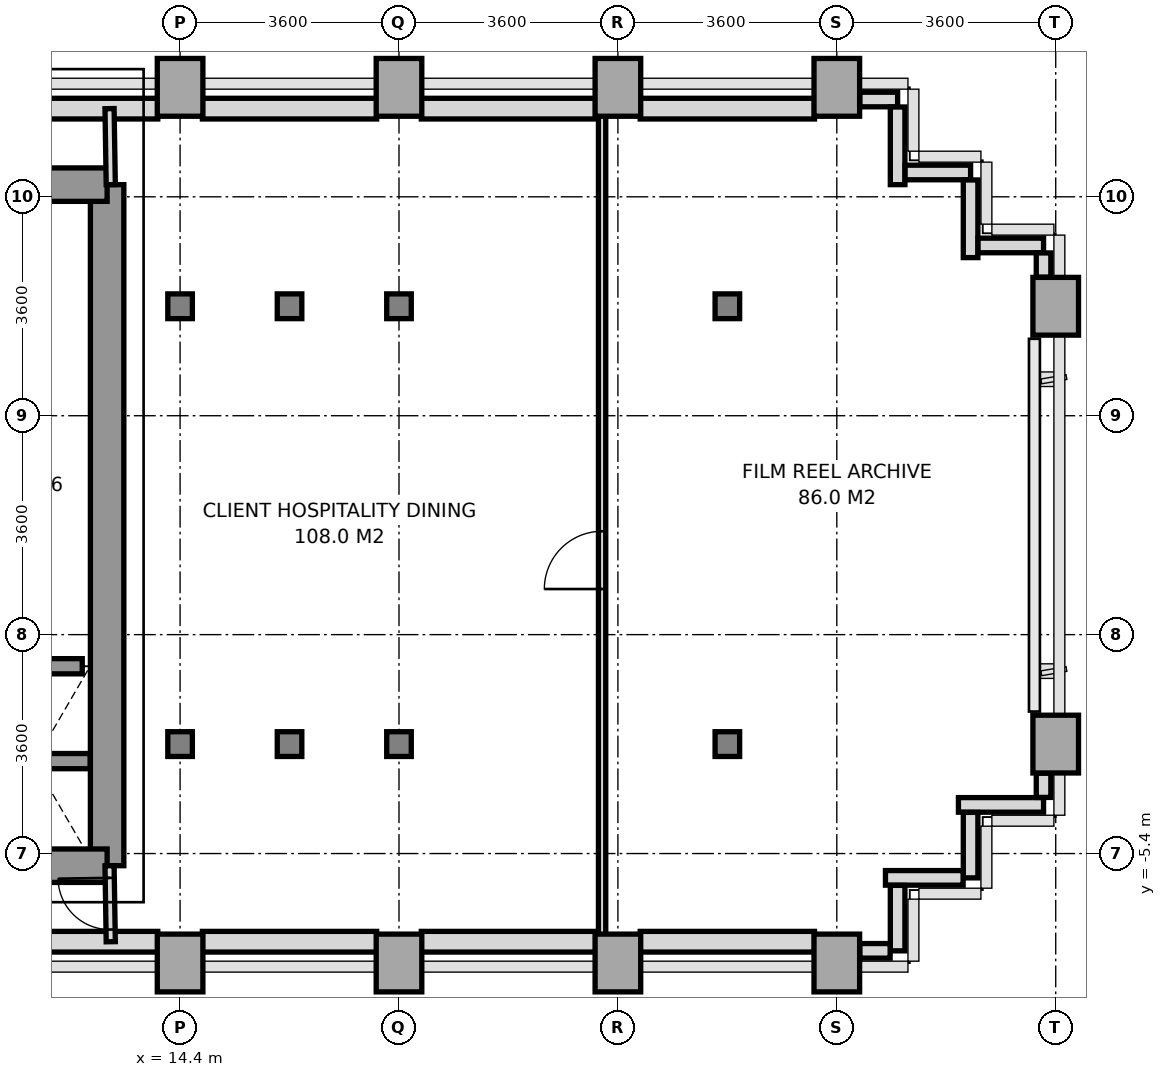
"""IFC4 building model, lengths in metres.
Left out: names, types, materials, properties, quantities, classifications, styles, units other than length and angle.
Written with IfcOpenShell. Run it as: python <this file> out.ifc"""

import sys

from ifc_helpers import new_model, si_unit, direction, frame, frame_2d, origin, origin_2d, place, context, subcontext, project, spatial, rectangle, i_section, extrude, source, transform, mapped, element, fill, save


model = new_model("IFC4")
c1 = context("Model", 3, precision=1e-05, world=origin(), true_north=direction((0.0, 1.0)))
c2 = subcontext(c1, "Body", "Model", "MODEL_VIEW")
j1 = project(units=[si_unit("LENGTHUNIT", "METRE"), si_unit("PLANEANGLEUNIT", "RADIAN")], contexts=[c1])
p1 = place(None, origin())
s1 = spatial("IfcSite", under=j1, at=p1, CompositionType="ELEMENT")
p2 = place(p1, origin())
s2 = spatial("IfcBuilding", under=s1, at=p2, CompositionType="ELEMENT")
p3 = place(p2, frame((0.0, 0.0, 85.0)))
s3 = spatial("IfcBuildingStorey", under=s2, at=p3, CompositionType="ELEMENT", Elevation=85.0)
m1 = source(origin(), c2, "Body", "SweptSolid", [
    extrude(rectangle(XDim=0.75, YDim=0.95, at=origin_2d()), origin(), (0.0, 0.0, 1.0), 3.14),
])
p4 = place(p3, frame((14.4, -7.2, 0.0), z_axis=(0.0, 0.0, 1.0), x_axis=(1.0, 0.0, 0.0)))
e1 = element("IfcColumn", 1, at=p4, inside=s3, PredefinedType="COLUMN", context=c2, shape_type="MappedRepresentation", body=[
    mapped(m1, transform((0.0, 0.0, 0.0), x_axis=(1.0, 0.0, 0.0), y_axis=(0.0, 1.0, 0.0), z_axis=(0.0, 0.0, 1.0), scale=1.0)),
])
m2 = source(origin(), c2, "Body", "SweptSolid", [
    extrude(i_section(OverallWidth=0.404, OverallDepth=0.407, WebThickness=0.022, FlangeThickness=0.035, at=origin_2d()), origin(), (0.0, 0.0, 1.0), 3.14),
])
for number, where, z_axis, x_axis in (
    (2, (14.4, -3.6, 0.0), (0.0, 0.0, 1.0), (1.0, 0.0, 0.0)),
    (3, (14.4, 3.6, 0.0), (0.0, 0.0, 1.0), (1.0, 0.0, 0.0)),
):
    element("IfcColumn", number, at=place(p3, frame(where, z_axis=z_axis, x_axis=x_axis)), inside=s3, PredefinedType="COLUMN", context=c2, shape_type="MappedRepresentation", body=[
        mapped(m2, transform((0.0, 0.0, 0.0), x_axis=(1.0, 0.0, 0.0), y_axis=(0.0, 1.0, 0.0), z_axis=(0.0, 0.0, 1.0), scale=1.0)),
    ])
p5 = place(p3, frame((14.4, 7.2, 0.0), z_axis=(0.0, 0.0, 1.0), x_axis=(1.0, 0.0, 0.0)))
e4 = element("IfcColumn", 4, at=p5, inside=s3, PredefinedType="COLUMN", context=c2, shape_type="MappedRepresentation", body=[
    mapped(m1, transform((0.0, 0.0, 0.0), x_axis=(1.0, 0.0, 0.0), y_axis=(0.0, 1.0, 0.0), z_axis=(0.0, 0.0, 1.0), scale=1.0)),
])
for number, where, z_axis, x_axis in (
    (5, (16.2, -3.6, 0.0), (0.0, 0.0, 1.0), (1.0, 0.0, 0.0)),
    (6, (16.2, 3.6, 0.0), (0.0, 0.0, 1.0), (1.0, 0.0, 0.0)),
):
    element("IfcColumn", number, at=place(p3, frame(where, z_axis=z_axis, x_axis=x_axis)), inside=s3, PredefinedType="COLUMN", context=c2, shape_type="MappedRepresentation", body=[
        mapped(m2, transform((0.0, 0.0, 0.0), x_axis=(1.0, 0.0, 0.0), y_axis=(0.0, 1.0, 0.0), z_axis=(0.0, 0.0, 1.0), scale=1.0)),
    ])
p6 = place(p3, frame((18.0, -7.2, 0.0), z_axis=(0.0, 0.0, 1.0), x_axis=(1.0, 0.0, 0.0)))
e7 = element("IfcColumn", 7, at=p6, inside=s3, PredefinedType="COLUMN", context=c2, shape_type="MappedRepresentation", body=[
    mapped(m1, transform((0.0, 0.0, 0.0), x_axis=(1.0, 0.0, 0.0), y_axis=(0.0, 1.0, 0.0), z_axis=(0.0, 0.0, 1.0), scale=1.0)),
])
for number, where, z_axis, x_axis in (
    (8, (18.0, -3.6, 0.0), (0.0, 0.0, 1.0), (1.0, 0.0, 0.0)),
    (9, (18.0, 3.6, 0.0), (0.0, 0.0, 1.0), (1.0, 0.0, 0.0)),
):
    element("IfcColumn", number, at=place(p3, frame(where, z_axis=z_axis, x_axis=x_axis)), inside=s3, PredefinedType="COLUMN", context=c2, shape_type="MappedRepresentation", body=[
        mapped(m2, transform((0.0, 0.0, 0.0), x_axis=(1.0, 0.0, 0.0), y_axis=(0.0, 1.0, 0.0), z_axis=(0.0, 0.0, 1.0), scale=1.0)),
    ])
for number, where, z_axis, x_axis in (
    (10, (18.0, 7.2, 0.0), (0.0, 0.0, 1.0), (1.0, 0.0, 0.0)),
    (11, (21.6, -7.2, 0.0), (0.0, 0.0, 1.0), (1.0, 0.0, 0.0)),
    (12, (21.6, 7.2, 0.0), (0.0, 0.0, 1.0), (1.0, 0.0, 0.0)),
):
    element("IfcColumn", number, at=place(p3, frame(where, z_axis=z_axis, x_axis=x_axis)), inside=s3, PredefinedType="COLUMN", context=c2, shape_type="MappedRepresentation", body=[
        mapped(m1, transform((0.0, 0.0, 0.0), x_axis=(1.0, 0.0, 0.0), y_axis=(0.0, 1.0, 0.0), z_axis=(0.0, 0.0, 1.0), scale=1.0)),
    ])
for number, where, z_axis, x_axis in (
    (13, (23.4, -3.6, 0.0), (0.0, 0.0, 1.0), (1.0, 0.0, 0.0)),
    (14, (23.4, 3.6, 0.0), (0.0, 0.0, 1.0), (1.0, 0.0, 0.0)),
):
    element("IfcColumn", number, at=place(p3, frame(where, z_axis=z_axis, x_axis=x_axis)), inside=s3, PredefinedType="COLUMN", context=c2, shape_type="MappedRepresentation", body=[
        mapped(m2, transform((0.0, 0.0, 0.0), x_axis=(1.0, 0.0, 0.0), y_axis=(0.0, 1.0, 0.0), z_axis=(0.0, 0.0, 1.0), scale=1.0)),
    ])
for number, where, z_axis, x_axis in (
    (15, (25.2, -7.2, 0.0), (0.0, 0.0, 1.0), (1.0, 0.0, 0.0)),
    (16, (25.2, 7.2, 0.0), (0.0, 0.0, 1.0), (1.0, 0.0, 0.0)),
    (17, (28.8, -3.6, 0.0), (0.0, 0.0, 1.0), (1.0, 0.0, 0.0)),
    (18, (28.8, 3.6, 0.0), (0.0, 0.0, 1.0), (1.0, 0.0, 0.0)),
):
    element("IfcColumn", number, at=place(p3, frame(where, z_axis=z_axis, x_axis=x_axis)), inside=s3, PredefinedType="COLUMN", context=c2, shape_type="MappedRepresentation", body=[
        mapped(m1, transform((0.0, 0.0, 0.0), x_axis=(1.0, 0.0, 0.0), y_axis=(0.0, 1.0, 0.0), z_axis=(0.0, 0.0, 1.0), scale=1.0)),
    ])
p7 = place(p3, frame((11.498, 6.85, 0.0), z_axis=(0.0, 0.0, 1.0), x_axis=(1.0, 0.0, 0.0)))
e19 = element("IfcWall", 19, at=p7, inside=s3, PredefinedType="SOLIDWALL", context=c2, shape_type="SweptSolid", body=[
    extrude(rectangle(XDim=2.535, YDim=0.34, at=frame_2d((1.268, 0.0))), origin(), (0.0, 0.0, 1.0), 3.14),
])
for number, where, z_axis, x_axis in (
    (20, (14.767, 6.85, 0.0), (0.0, 0.0, 1.0), (1.0, 0.0, 0.0)),
    (21, (18.367, 6.85, 0.0), (0.0, 0.0, 1.0), (1.0, 0.0, 0.0)),
    (22, (21.967, 6.85, 0.0), (0.0, 0.0, 1.0), (1.0, 0.0, 0.0)),
):
    element("IfcWall", number, at=place(p3, frame(where, z_axis=z_axis, x_axis=x_axis)), inside=s3, PredefinedType="SOLIDWALL", context=c2, shape_type="SweptSolid", body=[
        extrude(rectangle(XDim=2.866, YDim=0.34, at=frame_2d((1.433, 0.0))), origin(), (0.0, 0.0, 1.0), 2.39),
    ])
p8 = place(p3, frame((11.75, -6.85, 0.0), z_axis=(0.0, 0.0, 1.0), x_axis=(1.0, 0.0, 0.0)))
e23 = element("IfcWall", 23, at=p8, inside=s3, PredefinedType="SOLIDWALL", context=c2, shape_type="SweptSolid", body=[
    extrude(rectangle(XDim=2.283, YDim=0.34, at=frame_2d((1.142, 0.0))), origin(), (0.0, 0.0, 1.0), 3.14),
])
for number, where, z_axis, x_axis in (
    (24, (14.767, -6.85, 0.0), (0.0, 0.0, 1.0), (1.0, 0.0, 0.0)),
    (25, (18.367, -6.85, 0.0), (0.0, 0.0, 1.0), (1.0, 0.0, 0.0)),
    (26, (21.967, -6.85, 0.0), (0.0, 0.0, 1.0), (1.0, 0.0, 0.0)),
):
    element("IfcWall", number, at=place(p3, frame(where, z_axis=z_axis, x_axis=x_axis)), inside=s3, PredefinedType="SOLIDWALL", context=c2, shape_type="SweptSolid", body=[
        extrude(rectangle(XDim=2.866, YDim=0.34, at=frame_2d((1.433, 0.0))), origin(), (0.0, 0.0, 1.0), 2.39),
    ])
p9 = place(p3, frame((28.6, -4.6, 0.0), z_axis=(0.0, 0.0, 1.0), x_axis=(-1.0, 0.0, 0.0)))
e27 = element("IfcWall", 27, at=p9, inside=s3, PredefinedType="PARAPET", context=c2, shape_type="SweptSolid", body=[
    extrude(rectangle(XDim=1.4, YDim=0.24, at=frame_2d((0.7, 0.0))), origin(), (0.0, 0.0, 1.0), 1.15),
])
p10 = place(p3, frame((27.4, -4.723, 0.0), z_axis=(0.0, 0.0, 1.0), x_axis=(0.0, -1.0, 0.0)))
e28 = element("IfcWall", 28, at=p10, inside=s3, PredefinedType="PARAPET", context=c2, shape_type="SweptSolid", body=[
    extrude(rectangle(XDim=1.077, YDim=0.24, at=frame_2d((0.539, 0.0))), origin(), (0.0, 0.0, 1.0), 1.15),
])
p11 = place(p3, frame((27.277, -5.8, 0.0), z_axis=(0.0, 0.0, 1.0), x_axis=(-1.0, 0.0, 0.0)))
e29 = element("IfcWall", 29, at=p11, inside=s3, PredefinedType="PARAPET", context=c2, shape_type="SweptSolid", body=[
    extrude(rectangle(XDim=1.277, YDim=0.24, at=frame_2d((0.639, 0.0))), origin(), (0.0, 0.0, 1.0), 1.15),
])
p12 = place(p3, frame((26.2, -5.923, 0.0), z_axis=(0.0, 0.0, 1.0), x_axis=(0.0, -1.0, 0.0)))
e30 = element("IfcWall", 30, at=p12, inside=s3, PredefinedType="PARAPET", context=c2, shape_type="SweptSolid", body=[
    extrude(rectangle(XDim=1.077, YDim=0.24, at=frame_2d((0.539, 0.0))), origin(), (0.0, 0.0, 1.0), 1.15),
])
p13 = place(p3, frame((26.077, -7.0, 0.0), z_axis=(0.0, 0.0, 1.0), x_axis=(-1.0, 0.0, 0.0)))
e31 = element("IfcWall", 31, at=p13, inside=s3, PredefinedType="PARAPET", context=c2, shape_type="SweptSolid", body=[
    extrude(rectangle(XDim=0.499, YDim=0.24, at=frame_2d((0.25, 0.0))), origin(), (0.0, 0.0, 1.0), 1.15),
])
p14 = place(p3, frame((25.578, 7.0, 0.0), z_axis=(0.0, 0.0, 1.0), x_axis=(1.0, 0.0, 0.0)))
e32 = element("IfcWall", 32, at=p14, inside=s3, PredefinedType="PARAPET", context=c2, shape_type="SweptSolid", body=[
    extrude(rectangle(XDim=0.622, YDim=0.24, at=frame_2d((0.311, 0.0))), origin(), (0.0, 0.0, 1.0), 1.15),
])
p15 = place(p3, frame((26.2, 6.877, 0.0), z_axis=(0.0, 0.0, 1.0), x_axis=(0.0, -1.0, 0.0)))
e33 = element("IfcWall", 33, at=p15, inside=s3, PredefinedType="PARAPET", context=c2, shape_type="SweptSolid", body=[
    extrude(rectangle(XDim=1.277, YDim=0.24, at=frame_2d((0.638, 0.0))), origin(), (0.0, 0.0, 1.0), 1.15),
])
p16 = place(p3, frame((26.323, 5.8, 0.0), z_axis=(0.0, 0.0, 1.0), x_axis=(1.0, 0.0, 0.0)))
e34 = element("IfcWall", 34, at=p16, inside=s3, PredefinedType="PARAPET", context=c2, shape_type="SweptSolid", body=[
    extrude(rectangle(XDim=1.077, YDim=0.24, at=frame_2d((0.539, 0.0))), origin(), (0.0, 0.0, 1.0), 1.15),
])
p17 = place(p3, frame((27.4, 5.677, 0.0), z_axis=(0.0, 0.0, 1.0), x_axis=(0.0, -1.0, 0.0)))
e35 = element("IfcWall", 35, at=p17, inside=s3, PredefinedType="PARAPET", context=c2, shape_type="SweptSolid", body=[
    extrude(rectangle(XDim=1.277, YDim=0.24, at=frame_2d((0.639, 0.0))), origin(), (0.0, 0.0, 1.0), 1.15),
])
p18 = place(p3, frame((27.523, 4.6, 0.0), z_axis=(0.0, 0.0, 1.0), x_axis=(1.0, 0.0, 0.0)))
e36 = element("IfcWall", 36, at=p18, inside=s3, PredefinedType="PARAPET", context=c2, shape_type="SweptSolid", body=[
    extrude(rectangle(XDim=1.077, YDim=0.24, at=frame_2d((0.539, 0.0))), origin(), (0.0, 0.0, 1.0), 1.15),
])
for number, where, z_axis, x_axis in (
    (37, (28.6, 4.477, 0.0), (0.0, 0.0, 1.0), (0.0, -1.0, 0.0)),
    (38, (28.6, -4.078, 0.0), (0.0, 0.0, 1.0), (0.0, -1.0, 0.0)),
):
    element("IfcWall", number, at=place(p3, frame(where, z_axis=z_axis, x_axis=x_axis)), inside=s3, PredefinedType="PARAPET", context=c2, shape_type="SweptSolid", body=[
        extrude(rectangle(XDim=0.399, YDim=0.24, at=frame_2d((0.2, 0.0))), origin(), (0.0, 0.0, 1.0), 1.15),
    ])
p19 = place(p3, frame((13.2, -5.6, 0.0), z_axis=(0.0, 0.0, 1.0), x_axis=(0.0, 1.0, 0.0)))
e39 = element("IfcWall", 39, at=p19, inside=s3, PredefinedType="SHEAR", context=c2, shape_type="SweptSolid", body=[
    extrude(rectangle(XDim=11.2, YDim=0.55, at=frame_2d((5.6, 0.0))), origin(), (0.0, 0.0, 1.0), 3.14),
])
p20 = place(p3, frame((11.381, 5.6, 0.0), z_axis=(0.0, 0.0, 1.0), x_axis=(1.0, 0.0, 0.0)))
e40 = element("IfcWall", 40, at=p20, inside=s3, PredefinedType="SHEAR", context=c2, shape_type="SweptSolid", body=[
    extrude(rectangle(XDim=1.819, YDim=0.55, at=frame_2d((0.909, 0.0))), origin(), (0.0, 0.0, 1.0), 3.14),
])
p21 = place(p3, frame((5.4, -5.6, 0.0), z_axis=(0.0, 0.0, 1.0), x_axis=(1.0, 0.0, 0.0)))
e41 = element("IfcWall", 41, at=p21, inside=s3, PredefinedType="SHEAR", context=c2, shape_type="SweptSolid", body=[
    extrude(rectangle(XDim=7.8, YDim=0.55, at=frame_2d((3.9, 0.0))), origin(), (0.0, 0.0, 1.0), 3.14),
])
p22 = place(p21, frame((3.0, 0.0, 0.0)))
e42 = element("IfcOpeningElement", 42, at=p22, cuts=e41, PredefinedType="OPENING", context=c2, shape_type="SweptSolid", body=[
    extrude(rectangle(XDim=1.2, YDim=2.2, at=frame_2d((0.6, 1.1))), frame((0.0, 0.285, 0.0), z_axis=(0.0, -1.0, 0.0), x_axis=(1.0, 0.0, 0.0)), (0.0, 0.0, 1.0), 0.57),
])
p23 = place(p3, frame((11.08, -3.88, 0.0), z_axis=(0.0, 0.0, 1.0), x_axis=(1.0, 0.0, 0.0)))
e43 = element("IfcWall", 43, at=p23, inside=s3, PredefinedType="SOLIDWALL", context=c2, shape_type="SweptSolid", body=[
    extrude(rectangle(XDim=1.84, YDim=0.25, at=frame_2d((0.92, 0.0))), origin(), (0.0, 0.0, 1.0), 3.14),
])
p24 = place(p3, frame((11.209, -2.32, 0.0), z_axis=(0.0, 0.0, 1.0), x_axis=(1.0, 0.0, 0.0)))
e44 = element("IfcWall", 44, at=p24, inside=s3, PredefinedType="SOLIDWALL", context=c2, shape_type="SweptSolid", body=[
    extrude(rectangle(XDim=1.582, YDim=0.25, at=frame_2d((0.791, 0.0))), origin(), (0.0, 0.0, 1.0), 3.14),
])
p25 = place(p3, frame((13.26, 5.6, 0.0), z_axis=(0.0, 0.0, 1.0), x_axis=(-0.016013571389, 0.999871774545, 0.0)))
e45 = element("IfcWall", 45, at=p25, inside=s3, PredefinedType="PARTITIONING", context=c2, shape_type="SweptSolid", body=[
    extrude(rectangle(XDim=1.25, YDim=0.15, at=frame_2d((0.625, 0.0))), origin(), (0.0, 0.0, 1.0), 3.14),
])
p26 = place(p3, frame((13.26, -6.85, 0.0), z_axis=(0.0, 0.0, 1.0), x_axis=(-0.016013571389, 0.999871774545, 0.0)))
e46 = element("IfcWall", 46, at=p26, inside=s3, PredefinedType="PARTITIONING", context=c2, shape_type="SweptSolid", body=[
    extrude(rectangle(XDim=1.25, YDim=0.15, at=frame_2d((0.625, 0.0))), origin(), (0.0, 0.0, 1.0), 3.14),
])
p27 = place(p26, frame((0.2, 0.0, 0.0)))
e47 = element("IfcOpeningElement", 47, at=p27, cuts=e46, PredefinedType="OPENING", context=c2, shape_type="SweptSolid", body=[
    extrude(rectangle(XDim=0.85, YDim=2.1, at=frame_2d((0.425, 1.05))), frame((0.0, 0.085, 0.0), z_axis=(0.0, -1.0, 0.0), x_axis=(1.0, 0.0, 0.0)), (0.0, 0.0, 1.0), 0.17),
])
p28 = place(p3, frame((21.34, -6.85, 0.0), z_axis=(0.0, 0.0, 1.0), x_axis=(0.0, 1.0, 0.0)))
e48 = element("IfcWall", 48, at=p28, inside=s3, PredefinedType="PARTITIONING", context=c2, shape_type="SweptSolid", body=[
    extrude(rectangle(XDim=13.7, YDim=0.12, at=frame_2d((6.85, 0.0))), origin(), (0.0, 0.0, 1.0), 2.59),
])
p29 = place(p28, frame((5.8, 0.0, 0.0)))
e49 = element("IfcOpeningElement", 49, at=p29, cuts=e48, PredefinedType="OPENING", context=c2, shape_type="SweptSolid", body=[
    extrude(rectangle(XDim=0.95, YDim=2.15, at=frame_2d((0.475, 1.075))), frame((0.0, 0.07, 0.0), z_axis=(0.0, -1.0, 0.0), x_axis=(1.0, 0.0, 0.0)), (0.0, 0.0, 1.0), 0.14),
])
m3 = source(origin(), c2, "Body", "SweptSolid", [
    extrude(rectangle(XDim=0.85, YDim=2.1, at=frame_2d((0.425, 1.05))), frame((0.0, 0.025, 0.0), z_axis=(0.0, -1.0, 0.0), x_axis=(1.0, 0.0, 0.0)), (0.0, 0.0, 1.0), 0.05),
])
p30 = place(p27, origin())
e50 = element("IfcDoor", 50, at=p30, inside=s3, OperationType="SINGLE_SWING_RIGHT", PredefinedType="DOOR", context=c2, shape_type="MappedRepresentation", body=[
    mapped(m3, transform((0.0, 0.0, 0.0), x_axis=(1.0, 0.0, 0.0), y_axis=(0.0, 1.0, 0.0), z_axis=(0.0, 0.0, 1.0), scale=1.0)),
])
fill(e47, e50)
m4 = source(origin(), c2, "Body", "SweptSolid", [
    extrude(rectangle(XDim=0.95, YDim=2.15, at=frame_2d((0.475, 1.075))), frame((0.0, 0.025, 0.0), z_axis=(0.0, -1.0, 0.0), x_axis=(1.0, 0.0, 0.0)), (0.0, 0.0, 1.0), 0.05),
])
p31 = place(p29, origin())
e51 = element("IfcDoor", 51, at=p31, inside=s3, OperationType="SINGLE_SWING_LEFT", PredefinedType="DOOR", context=c2, shape_type="MappedRepresentation", body=[
    mapped(m4, transform((0.0, 0.0, 0.0), x_axis=(1.0, 0.0, 0.0), y_axis=(0.0, 1.0, 0.0), z_axis=(0.0, 0.0, 1.0), scale=1.0)),
])
fill(e49, e51)
save(model, sys.argv[1])
